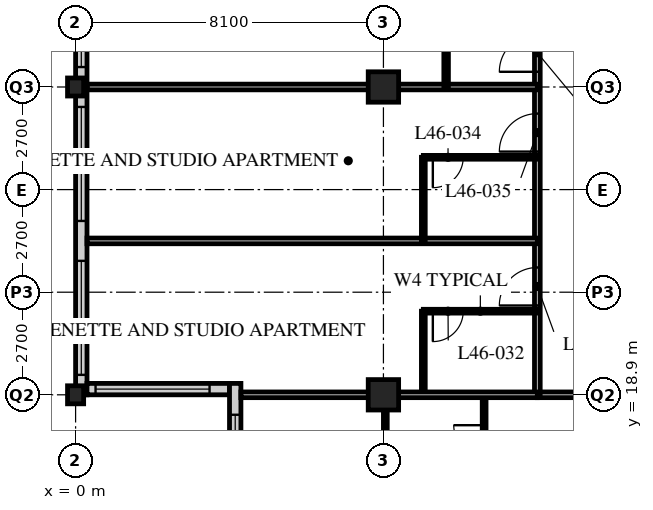
"""IFC4 building model, lengths in metres.
Left out: names, types, materials, properties, quantities, classifications, styles, units other than length and angle.
Written with IfcOpenShell. Run it as: python <this file> out.ifc"""

import sys

from ifc_helpers import new_model, si_unit, direction, frame, frame_2d, origin, origin_2d, place, context, subcontext, project, spatial, rectangle, hollow_rectangle, i_section, extrude, element, fill, save


model = new_model("IFC4")
c1 = context("Model", 3, precision=1e-05, world=origin(), true_north=direction((0.0, 1.0)))
c2 = subcontext(c1, "Body", "Model", "MODEL_VIEW")
j1 = project(units=[si_unit("LENGTHUNIT", "METRE"), si_unit("PLANEANGLEUNIT", "RADIAN")], contexts=[c1])
p1 = place(None, origin())
s1 = spatial("IfcSite", under=j1, at=p1, CompositionType="ELEMENT")
p2 = place(p1, origin())
s2 = spatial("IfcBuilding", under=s1, at=p2, CompositionType="ELEMENT")
p3 = place(p2, frame((0.0, 0.0, 181.2)))
s3 = spatial("IfcBuildingStorey", under=s2, at=p3, CompositionType="ELEMENT", Elevation=181.2)
for number, where, z_axis, x_axis in (
    (1, (0.0, 18.9, 0.0), (0.0, 0.0, 1.0), (1.0, 0.0, 0.0)),
    (2, (0.0, 27.0, 0.0), (0.0, 0.0, 1.0), (1.0, 0.0, 0.0)),
):
    element("IfcColumn", number, at=place(p3, frame(where, z_axis=z_axis, x_axis=x_axis)), inside=s3, PredefinedType="COLUMN", context=c2, shape_type="SweptSolid", body=[
        extrude(i_section(OverallWidth=0.424, OverallDepth=0.475, WebThickness=0.048, FlangeThickness=0.077, FilletRadius=0.015, at=origin_2d()), origin(), (0.0, 0.0, 1.0), 3.6),
    ])
for number, where, z_axis, x_axis in (
    (3, (8.1, 18.9, 0.0), (0.0, 0.0, 1.0), (1.0, 0.0, 0.0)),
    (4, (8.1, 27.0, 0.0), (0.0, 0.0, 1.0), (1.0, 0.0, 0.0)),
):
    element("IfcColumn", number, at=place(p3, frame(where, z_axis=z_axis, x_axis=x_axis)), inside=s3, PredefinedType="COLUMN", context=c2, shape_type="SweptSolid", body=[
        extrude(hollow_rectangle(XDim=0.8, YDim=0.8, WallThickness=0.08, at=origin_2d()), origin(), (0.0, 0.0, 1.0), 3.6),
    ])
p4 = place(p3, frame((0.15, 51.0, 0.0), z_axis=(0.0, 0.0, 1.0), x_axis=(0.0, -1.0, 0.0)))
e5 = element("IfcWall", 5, at=p4, inside=s3, PredefinedType="SOLIDWALL", context=c2, shape_type="SweptSolid", body=[
    extrude(rectangle(XDim=32.1, YDim=0.3, at=frame_2d((16.05, 0.0))), origin(), (0.0, 0.0, 1.0), 3.39),
])
p5 = place(p4, frame((0.225, 0.0, 0.6)))
e6 = element("IfcOpeningElement", 6, at=p5, cuts=e5, PredefinedType="OPENING", context=c2, shape_type="SweptSolid", body=[
    extrude(rectangle(XDim=3.0, YDim=2.4, at=frame_2d((1.5, 1.2))), frame((0.0, 0.16, 0.0), z_axis=(0.0, -1.0, 0.0), x_axis=(1.0, 0.0, 0.0)), (0.0, 0.0, 1.0), 0.32),
])
p6 = place(p4, frame((4.275, 0.0, 0.6)))
e7 = element("IfcOpeningElement", 7, at=p6, cuts=e5, PredefinedType="OPENING", context=c2, shape_type="SweptSolid", body=[
    extrude(rectangle(XDim=3.0, YDim=2.4, at=frame_2d((1.5, 1.2))), frame((0.0, 0.16, 0.0), z_axis=(0.0, -1.0, 0.0), x_axis=(1.0, 0.0, 0.0)), (0.0, 0.0, 1.0), 0.32),
])
p7 = place(p4, frame((8.325, 0.0, 0.6)))
e8 = element("IfcOpeningElement", 8, at=p7, cuts=e5, PredefinedType="OPENING", context=c2, shape_type="SweptSolid", body=[
    extrude(rectangle(XDim=3.0, YDim=2.4, at=frame_2d((1.5, 1.2))), frame((0.0, 0.16, 0.0), z_axis=(0.0, -1.0, 0.0), x_axis=(1.0, 0.0, 0.0)), (0.0, 0.0, 1.0), 0.32),
])
p8 = place(p4, frame((12.375, 0.0, 0.6)))
e9 = element("IfcOpeningElement", 9, at=p8, cuts=e5, PredefinedType="OPENING", context=c2, shape_type="SweptSolid", body=[
    extrude(rectangle(XDim=3.0, YDim=2.4, at=frame_2d((1.5, 1.2))), frame((0.0, 0.16, 0.0), z_axis=(0.0, -1.0, 0.0), x_axis=(1.0, 0.0, 0.0)), (0.0, 0.0, 1.0), 0.32),
])
p9 = place(p4, frame((16.425, 0.0, 0.6)))
e10 = element("IfcOpeningElement", 10, at=p9, cuts=e5, PredefinedType="OPENING", context=c2, shape_type="SweptSolid", body=[
    extrude(rectangle(XDim=3.0, YDim=2.4, at=frame_2d((1.5, 1.2))), frame((0.0, 0.16, 0.0), z_axis=(0.0, -1.0, 0.0), x_axis=(1.0, 0.0, 0.0)), (0.0, 0.0, 1.0), 0.32),
])
p10 = place(p4, frame((20.475, 0.0, 0.6)))
e11 = element("IfcOpeningElement", 11, at=p10, cuts=e5, PredefinedType="OPENING", context=c2, shape_type="SweptSolid", body=[
    extrude(rectangle(XDim=3.0, YDim=2.4, at=frame_2d((1.5, 1.2))), frame((0.0, 0.16, 0.0), z_axis=(0.0, -1.0, 0.0), x_axis=(1.0, 0.0, 0.0)), (0.0, 0.0, 1.0), 0.32),
])
p11 = place(p4, frame((24.525, 0.0, 0.6)))
e12 = element("IfcOpeningElement", 12, at=p11, cuts=e5, PredefinedType="OPENING", context=c2, shape_type="SweptSolid", body=[
    extrude(rectangle(XDim=3.0, YDim=2.4, at=frame_2d((1.5, 1.2))), frame((0.0, 0.16, 0.0), z_axis=(0.0, -1.0, 0.0), x_axis=(1.0, 0.0, 0.0)), (0.0, 0.0, 1.0), 0.32),
])
p12 = place(p4, frame((28.575, 0.0, 0.6)))
e13 = element("IfcOpeningElement", 13, at=p12, cuts=e5, PredefinedType="OPENING", context=c2, shape_type="SweptSolid", body=[
    extrude(rectangle(XDim=3.0, YDim=2.4, at=frame_2d((1.5, 1.2))), frame((0.0, 0.16, 0.0), z_axis=(0.0, -1.0, 0.0), x_axis=(1.0, 0.0, 0.0)), (0.0, 0.0, 1.0), 0.32),
])
p13 = place(p3, frame((0.3, 19.05, 0.0), z_axis=(0.0, 0.0, 1.0), x_axis=(1.0, 0.0, 0.0)))
e14 = element("IfcWall", 14, at=p13, inside=s3, PredefinedType="SOLIDWALL", context=c2, shape_type="SweptSolid", body=[
    extrude(rectangle(XDim=3.75, YDim=0.3, at=frame_2d((1.875, 0.0))), origin(), (0.0, 0.0, 1.0), 3.39),
])
p14 = place(p13, frame((0.225, 0.0, 0.6)))
e15 = element("IfcOpeningElement", 15, at=p14, cuts=e14, PredefinedType="OPENING", context=c2, shape_type="SweptSolid", body=[
    extrude(rectangle(XDim=3.0, YDim=2.0, at=frame_2d((1.5, 1.0))), frame((0.0, 0.16, 0.0), z_axis=(0.0, -1.0, 0.0), x_axis=(1.0, 0.0, 0.0)), (0.0, 0.0, 1.0), 0.32),
])
p15 = place(p3, frame((4.2, 19.2, 0.0), z_axis=(0.0, 0.0, 1.0), x_axis=(0.0, -1.0, 0.0)))
e16 = element("IfcWall", 16, at=p15, inside=s3, PredefinedType="SOLIDWALL", context=c2, shape_type="SweptSolid", body=[
    extrude(rectangle(XDim=4.35, YDim=0.3, at=frame_2d((2.175, 0.0))), origin(), (0.0, 0.0, 1.0), 3.39),
])
p16 = place(p15, frame((0.825, 0.0, 0.6)))
e17 = element("IfcOpeningElement", 17, at=p16, cuts=e16, PredefinedType="OPENING", context=c2, shape_type="SweptSolid", body=[
    extrude(rectangle(XDim=3.0, YDim=2.0, at=frame_2d((1.5, 1.0))), frame((0.0, 0.16, 0.0), z_axis=(0.0, -1.0, 0.0), x_axis=(1.0, 0.0, 0.0)), (0.0, 0.0, 1.0), 0.32),
])
p17 = place(p3, frame((12.15, 18.9, 0.0), z_axis=(0.0, 0.0, 1.0), x_axis=(1.0, 0.0, 0.0)))
e18 = element("IfcWall", 18, at=p17, inside=s3, PredefinedType="PARTITIONING", context=c2, shape_type="SweptSolid", body=[
    extrude(rectangle(XDim=32.4, YDim=0.15, at=frame_2d((16.2, 0.0))), origin(), (0.0, 0.0, 1.0), 2.778),
])
p18 = place(p17, frame((4.95, 0.0, 0.0)))
e19 = element("IfcOpeningElement", 19, at=p18, cuts=e18, PredefinedType="OPENING", context=c2, shape_type="SweptSolid", body=[
    extrude(rectangle(XDim=1.0, YDim=2.1, at=frame_2d((0.5, 1.05))), frame((0.0, 0.085, 0.0), z_axis=(0.0, -1.0, 0.0), x_axis=(1.0, 0.0, 0.0)), (0.0, 0.0, 1.0), 0.17),
])
p19 = place(p17, frame((13.05, 0.0, 0.0)))
e20 = element("IfcOpeningElement", 20, at=p19, cuts=e18, PredefinedType="OPENING", context=c2, shape_type="SweptSolid", body=[
    extrude(rectangle(XDim=1.0, YDim=2.1, at=frame_2d((0.5, 1.05))), frame((0.0, 0.085, 0.0), z_axis=(0.0, -1.0, 0.0), x_axis=(1.0, 0.0, 0.0)), (0.0, 0.0, 1.0), 0.17),
])
p20 = place(p17, frame((21.15, 0.0, 0.0)))
e21 = element("IfcOpeningElement", 21, at=p20, cuts=e18, PredefinedType="OPENING", context=c2, shape_type="SweptSolid", body=[
    extrude(rectangle(XDim=1.0, YDim=2.1, at=frame_2d((0.5, 1.05))), frame((0.0, 0.085, 0.0), z_axis=(0.0, -1.0, 0.0), x_axis=(1.0, 0.0, 0.0)), (0.0, 0.0, 1.0), 0.17),
])
p21 = place(p17, frame((1.525, 0.0, 0.0)))
e22 = element("IfcOpeningElement", 22, at=p21, cuts=e18, PredefinedType="OPENING", context=c2, shape_type="SweptSolid", body=[
    extrude(rectangle(XDim=1.0, YDim=2.1, at=frame_2d((0.5, 1.05))), frame((0.0, 0.085, 0.0), z_axis=(0.0, -1.0, 0.0), x_axis=(1.0, 0.0, 0.0)), (0.0, 0.0, 1.0), 0.17),
])
p22 = place(p17, frame((29.875, 0.0, 0.0)))
e23 = element("IfcOpeningElement", 23, at=p22, cuts=e18, PredefinedType="OPENING", context=c2, shape_type="SweptSolid", body=[
    extrude(rectangle(XDim=1.0, YDim=2.1, at=frame_2d((0.5, 1.05))), frame((0.0, 0.085, 0.0), z_axis=(0.0, -1.0, 0.0), x_axis=(1.0, 0.0, 0.0)), (0.0, 0.0, 1.0), 0.17),
])
p23 = place(p3, frame((12.15, 18.9, 0.0), z_axis=(0.0, 0.0, 1.0), x_axis=(0.0, 1.0, 0.0)))
e24 = element("IfcWall", 24, at=p23, inside=s3, PredefinedType="PARTITIONING", context=c2, shape_type="SweptSolid", body=[
    extrude(rectangle(XDim=28.35, YDim=0.15, at=frame_2d((14.175, 0.0))), origin(), (0.0, 0.0, 1.0), 3.39),
])
p24 = place(p23, frame((2.35, 0.0, 0.0)))
e25 = element("IfcOpeningElement", 25, at=p24, cuts=e24, PredefinedType="OPENING", context=c2, shape_type="SweptSolid", body=[
    extrude(rectangle(XDim=1.0, YDim=2.1, at=frame_2d((0.5, 1.05))), frame((0.0, 0.085, 0.0), z_axis=(0.0, -1.0, 0.0), x_axis=(1.0, 0.0, 0.0)), (0.0, 0.0, 1.0), 0.17),
])
p25 = place(p23, frame((6.4, 0.0, 0.0)))
e26 = element("IfcOpeningElement", 26, at=p25, cuts=e24, PredefinedType="OPENING", context=c2, shape_type="SweptSolid", body=[
    extrude(rectangle(XDim=1.0, YDim=2.1, at=frame_2d((0.5, 1.05))), frame((0.0, 0.085, 0.0), z_axis=(0.0, -1.0, 0.0), x_axis=(1.0, 0.0, 0.0)), (0.0, 0.0, 1.0), 0.17),
])
p26 = place(p23, frame((8.5, 0.0, 0.0)))
e27 = element("IfcOpeningElement", 27, at=p26, cuts=e24, PredefinedType="OPENING", context=c2, shape_type="SweptSolid", body=[
    extrude(rectangle(XDim=1.0, YDim=2.1, at=frame_2d((0.5, 1.05))), frame((0.0, 0.085, 0.0), z_axis=(0.0, -1.0, 0.0), x_axis=(1.0, 0.0, 0.0)), (0.0, 0.0, 1.0), 0.17),
])
p27 = place(p23, frame((16.6, 0.0, 0.0)))
e28 = element("IfcOpeningElement", 28, at=p27, cuts=e24, PredefinedType="OPENING", context=c2, shape_type="SweptSolid", body=[
    extrude(rectangle(XDim=1.0, YDim=2.1, at=frame_2d((0.5, 1.05))), frame((0.0, 0.085, 0.0), z_axis=(0.0, -1.0, 0.0), x_axis=(1.0, 0.0, 0.0)), (0.0, 0.0, 1.0), 0.17),
])
p28 = place(p23, frame((26.65, 0.0, 0.0)))
e29 = element("IfcOpeningElement", 29, at=p28, cuts=e24, PredefinedType="OPENING", context=c2, shape_type="SweptSolid", body=[
    extrude(rectangle(XDim=1.0, YDim=2.1, at=frame_2d((0.5, 1.05))), frame((0.0, 0.085, 0.0), z_axis=(0.0, -1.0, 0.0), x_axis=(1.0, 0.0, 0.0)), (0.0, 0.0, 1.0), 0.17),
])
p29 = place(p3, frame((9.15, 18.9, 0.0), z_axis=(0.0, 0.0, 1.0), x_axis=(0.0, 1.0, 0.0)))
e30 = element("IfcWall", 30, at=p29, inside=s3, PredefinedType="PARTITIONING", context=c2, shape_type="SweptSolid", body=[
    extrude(rectangle(XDim=2.2, YDim=0.1, at=frame_2d((1.1, 0.0))), origin(), (0.0, 0.0, 1.0), 3.39),
])
p30 = place(p3, frame((12.15, 21.1, 0.0), z_axis=(0.0, 0.0, 1.0), x_axis=(-1.0, 0.0, 0.0)))
e31 = element("IfcWall", 31, at=p30, inside=s3, PredefinedType="PARTITIONING", context=c2, shape_type="SweptSolid", body=[
    extrude(rectangle(XDim=3.0, YDim=0.1, at=frame_2d((1.5, 0.0))), origin(), (0.0, 0.0, 1.0), 3.39),
])
p31 = place(p30, frame((1.95, 0.0, 0.0)))
e32 = element("IfcOpeningElement", 32, at=p31, cuts=e31, PredefinedType="OPENING", context=c2, shape_type="SweptSolid", body=[
    extrude(rectangle(XDim=0.8, YDim=2.1, at=frame_2d((0.4, 1.05))), frame((0.0, 0.06, 0.0), z_axis=(0.0, -1.0, 0.0), x_axis=(1.0, 0.0, 0.0)), (0.0, 0.0, 1.0), 0.12),
])
p32 = place(p3, frame((12.15, 22.95, 0.0), z_axis=(0.0, 0.0, 1.0), x_axis=(-1.0, 0.0, 0.0)))
e33 = element("IfcWall", 33, at=p32, inside=s3, PredefinedType="PARTITIONING", context=c2, shape_type="SweptSolid", body=[
    extrude(rectangle(XDim=11.85, YDim=0.15, at=frame_2d((5.925, 0.0))), origin(), (0.0, 0.0, 1.0), 3.39),
])
p33 = place(p3, frame((9.15, 22.95, 0.0), z_axis=(0.0, 0.0, 1.0), x_axis=(0.0, 1.0, 0.0)))
e34 = element("IfcWall", 34, at=p33, inside=s3, PredefinedType="PARTITIONING", context=c2, shape_type="SweptSolid", body=[
    extrude(rectangle(XDim=2.2, YDim=0.1, at=frame_2d((1.1, 0.0))), origin(), (0.0, 0.0, 1.0), 3.39),
])
p34 = place(p3, frame((12.15, 25.15, 0.0), z_axis=(0.0, 0.0, 1.0), x_axis=(-1.0, 0.0, 0.0)))
e35 = element("IfcWall", 35, at=p34, inside=s3, PredefinedType="PARTITIONING", context=c2, shape_type="SweptSolid", body=[
    extrude(rectangle(XDim=3.0, YDim=0.1, at=frame_2d((1.5, 0.0))), origin(), (0.0, 0.0, 1.0), 3.39),
])
p35 = place(p34, frame((1.95, 0.0, 0.0)))
e36 = element("IfcOpeningElement", 36, at=p35, cuts=e35, PredefinedType="OPENING", context=c2, shape_type="SweptSolid", body=[
    extrude(rectangle(XDim=0.8, YDim=2.1, at=frame_2d((0.4, 1.05))), frame((0.0, 0.06, 0.0), z_axis=(0.0, -1.0, 0.0), x_axis=(1.0, 0.0, 0.0)), (0.0, 0.0, 1.0), 0.12),
])
p36 = place(p3, frame((12.15, 27.0, 0.0), z_axis=(0.0, 0.0, 1.0), x_axis=(-1.0, 0.0, 0.0)))
e37 = element("IfcWall", 37, at=p36, inside=s3, PredefinedType="PARTITIONING", context=c2, shape_type="SweptSolid", body=[
    extrude(rectangle(XDim=11.85, YDim=0.15, at=frame_2d((5.925, 0.0))), origin(), (0.0, 0.0, 1.0), 2.778),
])
p37 = place(p3, frame((9.75, 27.0, 0.0), z_axis=(0.0, 0.0, 1.0), x_axis=(0.0, 1.0, 0.0)))
e38 = element("IfcWall", 38, at=p37, inside=s3, PredefinedType="PARTITIONING", context=c2, shape_type="SweptSolid", body=[
    extrude(rectangle(XDim=16.2, YDim=0.12, at=frame_2d((8.1, 0.0))), origin(), (0.0, 0.0, 1.0), 3.39),
])
p38 = place(p37, frame((0.975, 0.0, 0.0)))
e39 = element("IfcOpeningElement", 39, at=p38, cuts=e38, PredefinedType="OPENING", context=c2, shape_type="SweptSolid", body=[
    extrude(rectangle(XDim=0.85, YDim=2.1, at=frame_2d((0.425, 1.05))), frame((0.0, 0.07, 0.0), z_axis=(0.0, -1.0, 0.0), x_axis=(1.0, 0.0, 0.0)), (0.0, 0.0, 1.0), 0.14),
])
p39 = place(p37, frame((4.375, 0.0, 0.0)))
e40 = element("IfcOpeningElement", 40, at=p39, cuts=e38, PredefinedType="OPENING", context=c2, shape_type="SweptSolid", body=[
    extrude(rectangle(XDim=0.85, YDim=2.1, at=frame_2d((0.425, 1.05))), frame((0.0, 0.07, 0.0), z_axis=(0.0, -1.0, 0.0), x_axis=(1.0, 0.0, 0.0)), (0.0, 0.0, 1.0), 0.14),
])
p40 = place(p37, frame((9.075, 0.0, 0.0)))
e41 = element("IfcOpeningElement", 41, at=p40, cuts=e38, PredefinedType="OPENING", context=c2, shape_type="SweptSolid", body=[
    extrude(rectangle(XDim=0.85, YDim=2.1, at=frame_2d((0.425, 1.05))), frame((0.0, 0.07, 0.0), z_axis=(0.0, -1.0, 0.0), x_axis=(1.0, 0.0, 0.0)), (0.0, 0.0, 1.0), 0.14),
])
p41 = place(p37, frame((12.475, 0.0, 0.0)))
e42 = element("IfcOpeningElement", 42, at=p41, cuts=e38, PredefinedType="OPENING", context=c2, shape_type="SweptSolid", body=[
    extrude(rectangle(XDim=0.85, YDim=2.1, at=frame_2d((0.425, 1.05))), frame((0.0, 0.07, 0.0), z_axis=(0.0, -1.0, 0.0), x_axis=(1.0, 0.0, 0.0)), (0.0, 0.0, 1.0), 0.14),
])
p42 = place(p3, frame((10.75, 18.9, 0.0), z_axis=(0.0, 0.0, 1.0), x_axis=(0.0, -1.0, 0.0)))
e43 = element("IfcWall", 43, at=p42, inside=s3, PredefinedType="PARTITIONING", context=c2, shape_type="SweptSolid", body=[
    extrude(rectangle(XDim=2.4, YDim=0.1, at=frame_2d((1.2, 0.0))), origin(), (0.0, 0.0, 1.0), 3.39),
])
p43 = place(p42, frame((0.8, 0.0, 0.0)))
e44 = element("IfcOpeningElement", 44, at=p43, cuts=e43, PredefinedType="OPENING", context=c2, shape_type="SweptSolid", body=[
    extrude(rectangle(XDim=0.8, YDim=2.1, at=frame_2d((0.4, 1.05))), frame((0.0, 0.06, 0.0), z_axis=(0.0, -1.0, 0.0), x_axis=(1.0, 0.0, 0.0)), (0.0, 0.0, 1.0), 0.12),
])
p44 = place(p3, frame((8.15, 18.9, 0.0), z_axis=(0.0, 0.0, 1.0), x_axis=(0.0, -1.0, 0.0)))
e45 = element("IfcWall", 45, at=p44, inside=s3, PredefinedType="PARTITIONING", context=c2, shape_type="SweptSolid", body=[
    extrude(rectangle(XDim=2.4, YDim=0.1, at=frame_2d((1.2, 0.0))), origin(), (0.0, 0.0, 1.0), 2.778),
])
p45 = place(p3, frame((4.35, 18.9, 0.0), z_axis=(0.0, 0.0, 1.0), x_axis=(1.0, 0.0, 0.0)))
e46 = element("IfcWall", 46, at=p45, inside=s3, PredefinedType="PARTITIONING", context=c2, shape_type="SweptSolid", body=[
    extrude(rectangle(XDim=7.8, YDim=0.15, at=frame_2d((3.9, 0.0))), origin(), (0.0, 0.0, 1.0), 2.778),
])
p46 = place(p10, origin())
e47 = element("IfcWindow", 47, at=p46, inside=s3, PartitioningType="SINGLE_PANEL", PredefinedType="WINDOW", context=c2, shape_type="SweptSolid", body=[
    extrude(rectangle(XDim=3.0, YDim=2.4, at=frame_2d((1.5, 1.2))), frame((0.0, 0.03, 0.0), z_axis=(0.0, -1.0, 0.0), x_axis=(1.0, 0.0, 0.0)), (0.0, 0.0, 1.0), 0.06),
])
fill(e11, e47)
p47 = place(p11, origin())
e48 = element("IfcWindow", 48, at=p47, inside=s3, PartitioningType="SINGLE_PANEL", PredefinedType="WINDOW", context=c2, shape_type="SweptSolid", body=[
    extrude(rectangle(XDim=3.0, YDim=2.4, at=frame_2d((1.5, 1.2))), frame((0.0, 0.03, 0.0), z_axis=(0.0, -1.0, 0.0), x_axis=(1.0, 0.0, 0.0)), (0.0, 0.0, 1.0), 0.06),
])
fill(e12, e48)
p48 = place(p12, origin())
e49 = element("IfcWindow", 49, at=p48, inside=s3, PartitioningType="SINGLE_PANEL", PredefinedType="WINDOW", context=c2, shape_type="SweptSolid", body=[
    extrude(rectangle(XDim=3.0, YDim=2.4, at=frame_2d((1.5, 1.2))), frame((0.0, 0.03, 0.0), z_axis=(0.0, -1.0, 0.0), x_axis=(1.0, 0.0, 0.0)), (0.0, 0.0, 1.0), 0.06),
])
fill(e13, e49)
p49 = place(p14, origin())
e50 = element("IfcWindow", 50, at=p49, inside=s3, PartitioningType="SINGLE_PANEL", PredefinedType="WINDOW", context=c2, shape_type="SweptSolid", body=[
    extrude(rectangle(XDim=3.0, YDim=2.0, at=frame_2d((1.5, 1.0))), frame((0.0, 0.03, 0.0), z_axis=(0.0, -1.0, 0.0), x_axis=(1.0, 0.0, 0.0)), (0.0, 0.0, 1.0), 0.06),
])
fill(e15, e50)
p50 = place(p16, origin())
e51 = element("IfcWindow", 51, at=p50, inside=s3, PartitioningType="SINGLE_PANEL", PredefinedType="WINDOW", context=c2, shape_type="SweptSolid", body=[
    extrude(rectangle(XDim=3.0, YDim=2.0, at=frame_2d((1.5, 1.0))), frame((0.0, 0.03, 0.0), z_axis=(0.0, -1.0, 0.0), x_axis=(1.0, 0.0, 0.0)), (0.0, 0.0, 1.0), 0.06),
])
fill(e17, e51)
p51 = place(p31, origin())
e52 = element("IfcDoor", 52, at=p51, inside=s3, OperationType="SINGLE_SWING_RIGHT", PredefinedType="DOOR", context=c2, shape_type="SweptSolid", body=[
    extrude(rectangle(XDim=0.8, YDim=2.1, at=frame_2d((0.4, 1.05))), frame((0.0, 0.025, 0.0), z_axis=(0.0, -1.0, 0.0), x_axis=(1.0, 0.0, 0.0)), (0.0, 0.0, 1.0), 0.05),
])
fill(e32, e52)
p52 = place(p24, origin())
e53 = element("IfcDoor", 53, at=p52, inside=s3, OperationType="SINGLE_SWING_LEFT", PredefinedType="DOOR", context=c2, shape_type="SweptSolid", body=[
    extrude(rectangle(XDim=1.0, YDim=2.1, at=frame_2d((0.5, 1.05))), frame((0.0, 0.025, 0.0), z_axis=(0.0, -1.0, 0.0), x_axis=(1.0, 0.0, 0.0)), (0.0, 0.0, 1.0), 0.05),
])
fill(e25, e53)
p53 = place(p35, origin())
e54 = element("IfcDoor", 54, at=p53, inside=s3, OperationType="SINGLE_SWING_RIGHT", PredefinedType="DOOR", context=c2, shape_type="SweptSolid", body=[
    extrude(rectangle(XDim=0.8, YDim=2.1, at=frame_2d((0.4, 1.05))), frame((0.0, 0.025, 0.0), z_axis=(0.0, -1.0, 0.0), x_axis=(1.0, 0.0, 0.0)), (0.0, 0.0, 1.0), 0.05),
])
fill(e36, e54)
p54 = place(p25, origin())
e55 = element("IfcDoor", 55, at=p54, inside=s3, OperationType="SINGLE_SWING_LEFT", PredefinedType="DOOR", context=c2, shape_type="SweptSolid", body=[
    extrude(rectangle(XDim=1.0, YDim=2.1, at=frame_2d((0.5, 1.05))), frame((0.0, 0.025, 0.0), z_axis=(0.0, -1.0, 0.0), x_axis=(1.0, 0.0, 0.0)), (0.0, 0.0, 1.0), 0.05),
])
fill(e26, e55)
p55 = place(p26, origin())
e56 = element("IfcDoor", 56, at=p55, inside=s3, OperationType="SINGLE_SWING_LEFT", PredefinedType="DOOR", context=c2, shape_type="SweptSolid", body=[
    extrude(rectangle(XDim=1.0, YDim=2.1, at=frame_2d((0.5, 1.05))), frame((0.0, 0.025, 0.0), z_axis=(0.0, -1.0, 0.0), x_axis=(1.0, 0.0, 0.0)), (0.0, 0.0, 1.0), 0.05),
])
fill(e27, e56)
p56 = place(p43, origin())
e57 = element("IfcDoor", 57, at=p56, inside=s3, OperationType="SINGLE_SWING_RIGHT", PredefinedType="DOOR", context=c2, shape_type="SweptSolid", body=[
    extrude(rectangle(XDim=0.8, YDim=2.1, at=frame_2d((0.4, 1.05))), frame((0.0, 0.025, 0.0), z_axis=(0.0, -1.0, 0.0), x_axis=(1.0, 0.0, 0.0)), (0.0, 0.0, 1.0), 0.05),
])
fill(e44, e57)
save(model, sys.argv[1])
